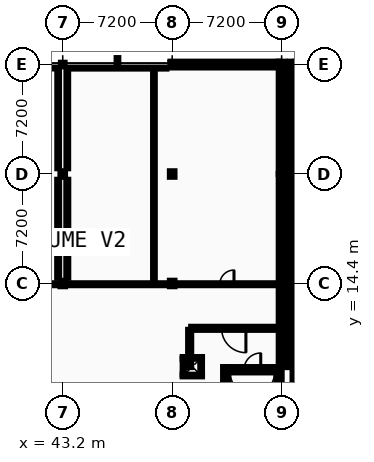
"""IFC4 building model, lengths in metres.
Left out: names, types, materials, properties, quantities, classifications, styles, units other than length and angle.
Written with IfcOpenShell. Run it as: python <this file> out.ifc"""

import sys

from ifc_helpers import new_model, si_unit, direction, frame, frame_2d, origin, origin_2d, place, context, subcontext, project, spatial, rectangle, i_section, extrude, element, fill, save


model = new_model("IFC4")
c1 = context("Model", 3, precision=1e-05, world=origin(), true_north=direction((0.0, 1.0)))
c2 = subcontext(c1, "Body", "Model", "MODEL_VIEW")
j1 = project(units=[si_unit("LENGTHUNIT", "METRE"), si_unit("PLANEANGLEUNIT", "RADIAN")], contexts=[c1])
p1 = place(None, origin())
s1 = spatial("IfcSite", under=j1, at=p1, CompositionType="ELEMENT")
p2 = place(p1, origin())
s2 = spatial("IfcBuilding", under=s1, at=p2, CompositionType="ELEMENT")
p3 = place(p2, frame((0.0, 0.0, 9.6)))
s3 = spatial("IfcBuildingStorey", under=s2, at=p3, CompositionType="ELEMENT", Elevation=9.6)
for number, where, z_axis, x_axis in (
    (1, (43.2, 14.4, 0.0), (0.0, 0.0, 1.0), (1.0, 0.0, 0.0)),
    (2, (43.2, 21.6, 0.0), (0.0, 0.0, 1.0), (1.0, 0.0, 0.0)),
):
    element("IfcColumn", number, at=place(p3, frame(where, z_axis=z_axis, x_axis=x_axis)), inside=s3, PredefinedType="COLUMN", context=c2, shape_type="SweptSolid", body=[
        extrude(i_section(OverallWidth=0.3, OverallDepth=0.36, WebThickness=0.012, FlangeThickness=0.022, FilletRadius=0.027, at=origin_2d()), origin(), (0.0, 0.0, 1.0), 4.4),
    ])
p4 = place(p3, frame((43.2, 28.8, 0.0), z_axis=(0.0, 0.0, 1.0), x_axis=(1.0, 0.0, 0.0)))
e3 = element("IfcColumn", 3, at=p4, inside=s3, PredefinedType="COLUMN", context=c2, shape_type="SweptSolid", body=[
    extrude(i_section(OverallWidth=0.24, OverallDepth=0.24, WebThickness=0.01, FlangeThickness=0.017, FilletRadius=0.021, at=origin_2d()), origin(), (0.0, 0.0, 1.0), 4.4),
])
for number, where, z_axis, x_axis in (
    (4, (50.4, 14.4, 0.0), (0.0, 0.0, 1.0), (1.0, 0.0, 0.0)),
    (5, (50.4, 21.6, 0.0), (0.0, 0.0, 1.0), (1.0, 0.0, 0.0)),
):
    element("IfcColumn", number, at=place(p3, frame(where, z_axis=z_axis, x_axis=x_axis)), inside=s3, PredefinedType="COLUMN", context=c2, shape_type="SweptSolid", body=[
        extrude(i_section(OverallWidth=0.3, OverallDepth=0.36, WebThickness=0.012, FlangeThickness=0.022, FilletRadius=0.027, at=origin_2d()), origin(), (0.0, 0.0, 1.0), 4.4),
    ])
p5 = place(p3, frame((50.4, 28.8, 0.0), z_axis=(0.0, 0.0, 1.0), x_axis=(1.0, 0.0, 0.0)))
e6 = element("IfcColumn", 6, at=p5, inside=s3, PredefinedType="COLUMN", context=c2, shape_type="SweptSolid", body=[
    extrude(i_section(OverallWidth=0.24, OverallDepth=0.24, WebThickness=0.01, FlangeThickness=0.017, FilletRadius=0.021, at=origin_2d()), origin(), (0.0, 0.0, 1.0), 4.4),
])
for number, where, z_axis, x_axis in (
    (7, (57.6, 14.4, 0.0), (0.0, 0.0, 1.0), (1.0, 0.0, 0.0)),
    (8, (57.6, 21.6, 0.0), (0.0, 0.0, 1.0), (1.0, 0.0, 0.0)),
):
    element("IfcColumn", number, at=place(p3, frame(where, z_axis=z_axis, x_axis=x_axis)), inside=s3, PredefinedType="COLUMN", context=c2, shape_type="SweptSolid", body=[
        extrude(i_section(OverallWidth=0.3, OverallDepth=0.36, WebThickness=0.012, FlangeThickness=0.022, FilletRadius=0.027, at=origin_2d()), origin(), (0.0, 0.0, 1.0), 4.4),
    ])
p6 = place(p3, frame((57.6, 28.8, 0.0), z_axis=(0.0, 0.0, 1.0), x_axis=(1.0, 0.0, 0.0)))
e9 = element("IfcColumn", 9, at=p6, inside=s3, PredefinedType="COLUMN", context=c2, shape_type="SweptSolid", body=[
    extrude(i_section(OverallWidth=0.24, OverallDepth=0.24, WebThickness=0.01, FlangeThickness=0.017, FilletRadius=0.021, at=origin_2d()), origin(), (0.0, 0.0, 1.0), 4.4),
])
for number, where, z_axis, x_axis in (
    (10, (58.32, 14.4, 0.0), (0.0, 0.0, 1.0), (1.0, 0.0, 0.0)),
    (11, (58.32, 21.6, 0.0), (0.0, 0.0, 1.0), (1.0, 0.0, 0.0)),
):
    element("IfcColumn", number, at=place(p3, frame(where, z_axis=z_axis, x_axis=x_axis)), inside=s3, PredefinedType="COLUMN", context=c2, shape_type="SweptSolid", body=[
        extrude(i_section(OverallWidth=0.3, OverallDepth=0.36, WebThickness=0.012, FlangeThickness=0.022, FilletRadius=0.027, at=origin_2d()), origin(), (0.0, 0.0, 1.0), 4.4),
    ])
p7 = place(p3, frame((58.32, 28.8, 0.0), z_axis=(0.0, 0.0, 1.0), x_axis=(1.0, 0.0, 0.0)))
e12 = element("IfcColumn", 12, at=p7, inside=s3, PredefinedType="COLUMN", context=c2, shape_type="SweptSolid", body=[
    extrude(i_section(OverallWidth=0.24, OverallDepth=0.24, WebThickness=0.01, FlangeThickness=0.017, FilletRadius=0.021, at=origin_2d()), origin(), (0.0, 0.0, 1.0), 4.4),
])
p8 = place(p3, frame((57.41, 28.8, 0.0), z_axis=(0.0, 0.0, 1.0), x_axis=(-1.0, 0.0, 0.0)))
e13 = element("IfcWall", 13, at=p8, inside=s3, PredefinedType="STANDARD", context=c2, shape_type="SweptSolid", body=[
    extrude(rectangle(XDim=7.12, YDim=0.38, at=frame_2d((3.56, 0.0))), origin(), (0.0, 0.0, 1.0), 3.9),
])
p9 = place(p8, frame((1.689, 0.0, 0.95)))
e14 = element("IfcOpeningElement", 14, at=p9, cuts=e13, PredefinedType="OPENING", context=c2, shape_type="SweptSolid", body=[
    extrude(rectangle(XDim=0.894, YDim=1.368, at=frame_2d((0.447, 0.684))), frame((0.0, 0.2, 0.0), z_axis=(0.0, -1.0, 0.0), x_axis=(1.0, 0.0, 0.0)), (0.0, 0.0, 1.0), 0.4),
])
p10 = place(p8, frame((4.537, 0.0, 0.95)))
e15 = element("IfcOpeningElement", 15, at=p10, cuts=e13, PredefinedType="OPENING", context=c2, shape_type="SweptSolid", body=[
    extrude(rectangle(XDim=0.894, YDim=1.368, at=frame_2d((0.447, 0.684))), frame((0.0, 0.2, 0.0), z_axis=(0.0, -1.0, 0.0), x_axis=(1.0, 0.0, 0.0)), (0.0, 0.0, 1.0), 0.4),
])
p11 = place(p3, frame((57.6, 8.9, 0.0), z_axis=(0.0, 0.0, 1.0), x_axis=(0.0, 1.0, 0.0)))
e16 = element("IfcWall", 16, at=p11, inside=s3, PredefinedType="STANDARD", context=c2, shape_type="SweptSolid", body=[
    extrude(rectangle(XDim=5.5, YDim=0.38, at=frame_2d((2.75, 0.0))), origin(), (0.0, 0.0, 1.0), 4.2),
])
p12 = place(p3, frame((57.6, 14.4, 0.0), z_axis=(0.0, 0.0, 1.0), x_axis=(0.0, 1.0, 0.0)))
e17 = element("IfcWall", 17, at=p12, inside=s3, PredefinedType="STANDARD", context=c2, shape_type="SweptSolid", body=[
    extrude(rectangle(XDim=7.2, YDim=0.38, at=frame_2d((3.6, 0.0))), origin(), (0.0, 0.0, 1.0), 3.895),
])
p13 = place(p12, frame((1.594, 0.0, 0.95)))
e18 = element("IfcOpeningElement", 18, at=p13, cuts=e17, PredefinedType="OPENING", context=c2, shape_type="SweptSolid", body=[
    extrude(rectangle(XDim=1.132, YDim=1.368, at=frame_2d((0.566, 0.684))), frame((0.0, 0.2, 0.0), z_axis=(0.0, -1.0, 0.0), x_axis=(1.0, 0.0, 0.0)), (0.0, 0.0, 1.0), 0.4),
])
p14 = place(p12, frame((4.474, 0.0, 0.95)))
e19 = element("IfcOpeningElement", 19, at=p14, cuts=e17, PredefinedType="OPENING", context=c2, shape_type="SweptSolid", body=[
    extrude(rectangle(XDim=1.132, YDim=1.368, at=frame_2d((0.566, 0.684))), frame((0.0, 0.2, 0.0), z_axis=(0.0, -1.0, 0.0), x_axis=(1.0, 0.0, 0.0)), (0.0, 0.0, 1.0), 0.4),
])
p15 = place(p3, frame((57.6, 21.6, 0.0), z_axis=(0.0, 0.0, 1.0), x_axis=(0.0, 1.0, 0.0)))
e20 = element("IfcWall", 20, at=p15, inside=s3, PredefinedType="STANDARD", context=c2, shape_type="SweptSolid", body=[
    extrude(rectangle(XDim=7.39, YDim=0.38, at=frame_2d((3.695, 0.0))), origin(), (0.0, 0.0, 1.0), 3.9),
])
p16 = place(p15, frame((1.634, 0.0, 0.95)))
e21 = element("IfcOpeningElement", 21, at=p16, cuts=e20, PredefinedType="OPENING", context=c2, shape_type="SweptSolid", body=[
    extrude(rectangle(XDim=1.166, YDim=1.368, at=frame_2d((0.583, 0.684))), frame((0.0, 0.2, 0.0), z_axis=(0.0, -1.0, 0.0), x_axis=(1.0, 0.0, 0.0)), (0.0, 0.0, 1.0), 0.4),
])
p17 = place(p15, frame((4.59, 0.0, 0.95)))
e22 = element("IfcOpeningElement", 22, at=p17, cuts=e20, PredefinedType="OPENING", context=c2, shape_type="SweptSolid", body=[
    extrude(rectangle(XDim=1.166, YDim=1.368, at=frame_2d((0.583, 0.684))), frame((0.0, 0.2, 0.0), z_axis=(0.0, -1.0, 0.0), x_axis=(1.0, 0.0, 0.0)), (0.0, 0.0, 1.0), 0.4),
])
p18 = place(p3, frame((58.32, 14.4, 0.0), z_axis=(0.0, 0.0, 1.0), x_axis=(0.0, -1.0, 0.0)))
e23 = element("IfcWall", 23, at=p18, inside=s3, PredefinedType="STANDARD", context=c2, shape_type="SweptSolid", body=[
    extrude(rectangle(XDim=5.5, YDim=0.38, at=frame_2d((2.75, 0.0))), origin(), (0.0, 0.0, 1.0), 4.2),
])
p19 = place(p3, frame((58.32, 21.6, 0.0), z_axis=(0.0, 0.0, 1.0), x_axis=(0.0, -1.0, 0.0)))
e24 = element("IfcWall", 24, at=p19, inside=s3, PredefinedType="STANDARD", context=c2, shape_type="SweptSolid", body=[
    extrude(rectangle(XDim=7.2, YDim=0.38, at=frame_2d((3.6, 0.0))), origin(), (0.0, 0.0, 1.0), 3.895),
])
p20 = place(p19, frame((1.713, 0.0, 0.95)))
e25 = element("IfcOpeningElement", 25, at=p20, cuts=e24, PredefinedType="OPENING", context=c2, shape_type="SweptSolid", body=[
    extrude(rectangle(XDim=0.894, YDim=1.332, at=frame_2d((0.447, 0.666))), frame((0.0, 0.2, 0.0), z_axis=(0.0, -1.0, 0.0), x_axis=(1.0, 0.0, 0.0)), (0.0, 0.0, 1.0), 0.4),
])
p21 = place(p19, frame((4.593, 0.0, 0.95)))
e26 = element("IfcOpeningElement", 26, at=p21, cuts=e24, PredefinedType="OPENING", context=c2, shape_type="SweptSolid", body=[
    extrude(rectangle(XDim=0.894, YDim=1.332, at=frame_2d((0.447, 0.666))), frame((0.0, 0.2, 0.0), z_axis=(0.0, -1.0, 0.0), x_axis=(1.0, 0.0, 0.0)), (0.0, 0.0, 1.0), 0.4),
])
p22 = place(p3, frame((58.32, 28.99, 0.0), z_axis=(0.0, 0.0, 1.0), x_axis=(0.0, -1.0, 0.0)))
e27 = element("IfcWall", 27, at=p22, inside=s3, PredefinedType="STANDARD", context=c2, shape_type="SweptSolid", body=[
    extrude(rectangle(XDim=7.39, YDim=0.38, at=frame_2d((3.695, 0.0))), origin(), (0.0, 0.0, 1.0), 3.9),
])
p23 = place(p22, frame((1.753, 0.0, 0.95)))
e28 = element("IfcOpeningElement", 28, at=p23, cuts=e27, PredefinedType="OPENING", context=c2, shape_type="SweptSolid", body=[
    extrude(rectangle(XDim=0.928, YDim=1.332, at=frame_2d((0.464, 0.666))), frame((0.0, 0.2, 0.0), z_axis=(0.0, -1.0, 0.0), x_axis=(1.0, 0.0, 0.0)), (0.0, 0.0, 1.0), 0.4),
])
p24 = place(p22, frame((4.709, 0.0, 0.95)))
e29 = element("IfcOpeningElement", 29, at=p24, cuts=e27, PredefinedType="OPENING", context=c2, shape_type="SweptSolid", body=[
    extrude(rectangle(XDim=0.928, YDim=1.332, at=frame_2d((0.464, 0.666))), frame((0.0, 0.2, 0.0), z_axis=(0.0, -1.0, 0.0), x_axis=(1.0, 0.0, 0.0)), (0.0, 0.0, 1.0), 0.4),
])
p25 = place(p3, frame((54.1, 8.725, 0.0), z_axis=(0.0, 0.0, 1.0), x_axis=(1.0, 0.0, 0.0)))
e30 = element("IfcWall", 30, at=p25, inside=s3, PredefinedType="SHEAR", context=c2, shape_type="SweptSolid", body=[
    extrude(rectangle(XDim=3.15, YDim=0.35, at=frame_2d((1.575, 0.0))), origin(), (0.0, 0.0, 1.0), 4.2),
])
p26 = place(p25, frame((1.025, 0.0, 0.0)))
e31 = element("IfcOpeningElement", 31, at=p26, cuts=e30, PredefinedType="OPENING", context=c2, shape_type="SweptSolid", body=[
    extrude(rectangle(XDim=1.1, YDim=2.15, at=frame_2d((0.55, 1.075))), frame((0.0, 0.185, 0.0), z_axis=(0.0, -1.0, 0.0), x_axis=(1.0, 0.0, 0.0)), (0.0, 0.0, 1.0), 0.37),
])
for number, where, z_axis, x_axis in (
    (32, (53.925, 0.4, 0.0), (0.0, 0.0, 1.0), (0.0, 1.0, 0.0)),
    (33, (57.425, 0.4, 0.0), (0.0, 0.0, 1.0), (0.0, 1.0, 0.0)),
):
    element("IfcWall", number, at=place(p3, frame(where, z_axis=z_axis, x_axis=x_axis)), inside=s3, PredefinedType="SHEAR", context=c2, shape_type="SweptSolid", body=[
        extrude(rectangle(XDim=8.5, YDim=0.35, at=frame_2d((4.25, 0.0))), origin(), (0.0, 0.0, 1.0), 4.2),
    ])
p27 = place(p3, frame((51.65, 11.45, 0.0), z_axis=(0.0, 0.0, 1.0), x_axis=(1.0, 0.0, 0.0)))
e34 = element("IfcWall", 34, at=p27, inside=s3, PredefinedType="PARTITIONING", context=c2, shape_type="SweptSolid", body=[
    extrude(rectangle(XDim=5.6, YDim=0.2, at=frame_2d((2.8, 0.0))), origin(), (0.0, 0.0, 1.0), 4.2),
])
p28 = place(p27, frame((2.0, 0.0, 0.0)))
e35 = element("IfcOpeningElement", 35, at=p28, cuts=e34, PredefinedType="OPENING", context=c2, shape_type="SweptSolid", body=[
    extrude(rectangle(XDim=1.6, YDim=2.2, at=frame_2d((0.8, 1.1))), frame((0.0, 0.11, 0.0), z_axis=(0.0, -1.0, 0.0), x_axis=(1.0, 0.0, 0.0)), (0.0, 0.0, 1.0), 0.22),
])
p29 = place(p3, frame((51.55, 8.9, 0.0), z_axis=(0.0, 0.0, 1.0), x_axis=(0.0, 1.0, 0.0)))
e36 = element("IfcWall", 36, at=p29, inside=s3, PredefinedType="PARTITIONING", context=c2, shape_type="SweptSolid", body=[
    extrude(rectangle(XDim=2.45, YDim=0.2, at=frame_2d((1.225, 0.0))), origin(), (0.0, 0.0, 1.0), 4.2),
])
p30 = place(p3, frame((58.495, 0.4, 0.0), z_axis=(0.0, 0.0, 1.0), x_axis=(0.0, 1.0, 0.0)))
e37 = element("IfcWall", 37, at=p30, inside=s3, PredefinedType="SHEAR", context=c2, shape_type="SweptSolid", body=[
    extrude(rectangle(XDim=8.5, YDim=0.35, at=frame_2d((4.25, 0.0))), origin(), (0.0, 0.0, 1.0), 4.2),
])
for number, where, z_axis, x_axis in (
    (38, (51.09, 8.345, 0.0), (0.0, 0.0, 1.0), (1.0, 0.0, 0.0)),
    (39, (51.09, 9.505, 0.0), (0.0, 0.0, 1.0), (1.0, 0.0, 0.0)),
):
    element("IfcWall", number, at=place(p3, frame(where, z_axis=z_axis, x_axis=x_axis)), inside=s3, PredefinedType="PARTITIONING", context=c2, shape_type="SweptSolid", body=[
        extrude(rectangle(XDim=1.27, YDim=0.11, at=frame_2d((0.635, 0.0))), origin(), (0.0, 0.0, 1.0), 4.2),
    ])
for number, where, z_axis, x_axis in (
    (40, (51.145, 8.4, 0.0), (0.0, 0.0, 1.0), (0.0, 1.0, 0.0)),
    (41, (52.305, 8.4, 0.0), (0.0, 0.0, 1.0), (0.0, 1.0, 0.0)),
):
    element("IfcWall", number, at=place(p3, frame(where, z_axis=z_axis, x_axis=x_axis)), inside=s3, PredefinedType="PARTITIONING", context=c2, shape_type="SweptSolid", body=[
        extrude(rectangle(XDim=1.05, YDim=0.11, at=frame_2d((0.525, 0.0))), origin(), (0.0, 0.0, 1.0), 4.2),
    ])
p31 = place(p3, frame((36.38, 14.35, 0.0), z_axis=(0.0, 0.0, 1.0), x_axis=(1.0, 0.0, 0.0)))
e42 = element("IfcWall", 42, at=p31, inside=s3, PredefinedType="PARTITIONING", context=c2, shape_type="SweptSolid", body=[
    extrude(rectangle(XDim=6.44, YDim=0.125, at=frame_2d((3.22, 0.0))), origin(), (0.0, 0.0, 1.0), 3.895),
])
p32 = place(p31, frame((3.14, 0.0, 0.0)))
e43 = element("IfcOpeningElement", 43, at=p32, cuts=e42, PredefinedType="OPENING", context=c2, shape_type="SweptSolid", body=[
    extrude(rectangle(XDim=0.9, YDim=2.1, at=frame_2d((0.45, 1.05))), frame((0.0, 0.073, 0.0), z_axis=(0.0, -1.0, 0.0), x_axis=(1.0, 0.0, 0.0)), (0.0, 0.0, 1.0), 0.145),
])
p33 = place(p3, frame((43.58, 14.35, 0.0), z_axis=(0.0, 0.0, 1.0), x_axis=(1.0, 0.0, 0.0)))
e44 = element("IfcWall", 44, at=p33, inside=s3, PredefinedType="PARTITIONING", context=c2, shape_type="SweptSolid", body=[
    extrude(rectangle(XDim=6.44, YDim=0.125, at=frame_2d((3.22, 0.0))), origin(), (0.0, 0.0, 1.0), 3.895),
])
p34 = place(p33, frame((2.31, 0.0, 0.0)))
e45 = element("IfcOpeningElement", 45, at=p34, cuts=e44, PredefinedType="OPENING", context=c2, shape_type="SweptSolid", body=[
    extrude(rectangle(XDim=1.0, YDim=2.1, at=frame_2d((0.5, 1.05))), frame((0.0, 0.073, 0.0), z_axis=(0.0, -1.0, 0.0), x_axis=(1.0, 0.0, 0.0)), (0.0, 0.0, 1.0), 0.145),
])
p35 = place(p3, frame((50.78, 14.35, 0.0), z_axis=(0.0, 0.0, 1.0), x_axis=(1.0, 0.0, 0.0)))
e46 = element("IfcWall", 46, at=p35, inside=s3, PredefinedType="PARTITIONING", context=c2, shape_type="SweptSolid", body=[
    extrude(rectangle(XDim=6.44, YDim=0.125, at=frame_2d((3.22, 0.0))), origin(), (0.0, 0.0, 1.0), 3.895),
])
p36 = place(p35, frame((2.754, 0.0, 0.0)))
e47 = element("IfcOpeningElement", 47, at=p36, cuts=e46, PredefinedType="OPENING", context=c2, shape_type="SweptSolid", body=[
    extrude(rectangle(XDim=0.932, YDim=2.152, at=frame_2d((0.466, 1.076))), frame((0.0, 0.073, 0.0), z_axis=(0.0, -1.0, 0.0), x_axis=(1.0, 0.0, 0.0)), (0.0, 0.0, 1.0), 0.145),
])
p37 = place(p3, frame((36.38, 28.6, 0.0), z_axis=(0.0, 0.0, 1.0), x_axis=(1.0, 0.0, 0.0)))
e48 = element("IfcWall", 48, at=p37, inside=s3, PredefinedType="PARTITIONING", context=c2, shape_type="SweptSolid", body=[
    extrude(rectangle(XDim=6.44, YDim=0.11, at=frame_2d((3.22, 0.0))), origin(), (0.0, 0.0, 1.0), 3.9),
])
p38 = place(p3, frame((43.58, 28.6, 0.0), z_axis=(0.0, 0.0, 1.0), x_axis=(1.0, 0.0, 0.0)))
e49 = element("IfcWall", 49, at=p38, inside=s3, PredefinedType="PARTITIONING", context=c2, shape_type="SweptSolid", body=[
    extrude(rectangle(XDim=6.44, YDim=0.125, at=frame_2d((3.22, 0.0))), origin(), (0.0, 0.0, 1.0), 3.9),
])
p39 = place(p3, frame((42.9, 14.78, 0.0), z_axis=(0.0, 0.0, 1.0), x_axis=(0.0, 1.0, 0.0)))
e50 = element("IfcWall", 50, at=p39, inside=s3, PredefinedType="PARTITIONING", context=c2, shape_type="SweptSolid", body=[
    extrude(rectangle(XDim=6.44, YDim=0.125, at=frame_2d((3.22, 0.0))), origin(), (0.0, 0.0, 1.0), 4.2),
])
p40 = place(p3, frame((42.9, 21.98, 0.0), z_axis=(0.0, 0.0, 1.0), x_axis=(0.0, 1.0, 0.0)))
e51 = element("IfcWall", 51, at=p40, inside=s3, PredefinedType="PARTITIONING", context=c2, shape_type="SweptSolid", body=[
    extrude(rectangle(XDim=6.44, YDim=0.11, at=frame_2d((3.22, 0.0))), origin(), (0.0, 0.0, 1.0), 4.2),
])
p41 = place(p3, frame((43.5, 14.78, 0.0), z_axis=(0.0, 0.0, 1.0), x_axis=(0.0, 1.0, 0.0)))
e52 = element("IfcWall", 52, at=p41, inside=s3, PredefinedType="PARTITIONING", context=c2, shape_type="SweptSolid", body=[
    extrude(rectangle(XDim=6.44, YDim=0.125, at=frame_2d((3.22, 0.0))), origin(), (0.0, 0.0, 1.0), 4.2),
])
p42 = place(p3, frame((43.5, 21.98, 0.0), z_axis=(0.0, 0.0, 1.0), x_axis=(0.0, 1.0, 0.0)))
e53 = element("IfcWall", 53, at=p42, inside=s3, PredefinedType="PARTITIONING", context=c2, shape_type="SweptSolid", body=[
    extrude(rectangle(XDim=6.44, YDim=0.11, at=frame_2d((3.22, 0.0))), origin(), (0.0, 0.0, 1.0), 4.2),
])
p43 = place(p3, frame((49.2, 14.413, 0.0), z_axis=(0.0, 0.0, 1.0), x_axis=(0.0, 1.0, 0.0)))
e54 = element("IfcWall", 54, at=p43, inside=s3, PredefinedType="PARTITIONING", context=c2, shape_type="SweptSolid", body=[
    extrude(rectangle(XDim=14.125, YDim=0.11, at=frame_2d((7.062, 0.0))), origin(), (0.0, 0.0, 1.0), 4.2),
])
p44 = place(p9, origin())
e55 = element("IfcWindow", 55, at=p44, inside=s3, PartitioningType="SINGLE_PANEL", PredefinedType="WINDOW", context=c2, shape_type="SweptSolid", body=[
    extrude(rectangle(XDim=0.894, YDim=1.368, at=frame_2d((0.447, 0.684))), frame((0.0, 0.03, 0.0), z_axis=(0.0, -1.0, 0.0), x_axis=(1.0, 0.0, 0.0)), (0.0, 0.0, 1.0), 0.06),
])
fill(e14, e55)
p45 = place(p10, origin())
e56 = element("IfcWindow", 56, at=p45, inside=s3, PartitioningType="SINGLE_PANEL", PredefinedType="WINDOW", context=c2, shape_type="SweptSolid", body=[
    extrude(rectangle(XDim=0.894, YDim=1.368, at=frame_2d((0.447, 0.684))), frame((0.0, 0.03, 0.0), z_axis=(0.0, -1.0, 0.0), x_axis=(1.0, 0.0, 0.0)), (0.0, 0.0, 1.0), 0.06),
])
fill(e15, e56)
p46 = place(p13, origin())
e57 = element("IfcWindow", 57, at=p46, inside=s3, PartitioningType="SINGLE_PANEL", PredefinedType="WINDOW", context=c2, shape_type="SweptSolid", body=[
    extrude(rectangle(XDim=1.132, YDim=1.368, at=frame_2d((0.566, 0.684))), frame((0.0, 0.03, 0.0), z_axis=(0.0, -1.0, 0.0), x_axis=(1.0, 0.0, 0.0)), (0.0, 0.0, 1.0), 0.06),
])
fill(e18, e57)
p47 = place(p14, origin())
e58 = element("IfcWindow", 58, at=p47, inside=s3, PartitioningType="SINGLE_PANEL", PredefinedType="WINDOW", context=c2, shape_type="SweptSolid", body=[
    extrude(rectangle(XDim=1.132, YDim=1.368, at=frame_2d((0.566, 0.684))), frame((0.0, 0.03, 0.0), z_axis=(0.0, -1.0, 0.0), x_axis=(1.0, 0.0, 0.0)), (0.0, 0.0, 1.0), 0.06),
])
fill(e19, e58)
p48 = place(p16, origin())
e59 = element("IfcWindow", 59, at=p48, inside=s3, PartitioningType="SINGLE_PANEL", PredefinedType="WINDOW", context=c2, shape_type="SweptSolid", body=[
    extrude(rectangle(XDim=1.166, YDim=1.368, at=frame_2d((0.583, 0.684))), frame((0.0, 0.03, 0.0), z_axis=(0.0, -1.0, 0.0), x_axis=(1.0, 0.0, 0.0)), (0.0, 0.0, 1.0), 0.06),
])
fill(e21, e59)
p49 = place(p17, origin())
e60 = element("IfcWindow", 60, at=p49, inside=s3, PartitioningType="SINGLE_PANEL", PredefinedType="WINDOW", context=c2, shape_type="SweptSolid", body=[
    extrude(rectangle(XDim=1.166, YDim=1.368, at=frame_2d((0.583, 0.684))), frame((0.0, 0.03, 0.0), z_axis=(0.0, -1.0, 0.0), x_axis=(1.0, 0.0, 0.0)), (0.0, 0.0, 1.0), 0.06),
])
fill(e22, e60)
p50 = place(p20, origin())
e61 = element("IfcWindow", 61, at=p50, inside=s3, PartitioningType="SINGLE_PANEL", PredefinedType="WINDOW", context=c2, shape_type="SweptSolid", body=[
    extrude(rectangle(XDim=0.894, YDim=1.332, at=frame_2d((0.447, 0.666))), frame((0.0, 0.03, 0.0), z_axis=(0.0, -1.0, 0.0), x_axis=(1.0, 0.0, 0.0)), (0.0, 0.0, 1.0), 0.06),
])
fill(e25, e61)
p51 = place(p21, origin())
e62 = element("IfcWindow", 62, at=p51, inside=s3, PartitioningType="SINGLE_PANEL", PredefinedType="WINDOW", context=c2, shape_type="SweptSolid", body=[
    extrude(rectangle(XDim=0.894, YDim=1.332, at=frame_2d((0.447, 0.666))), frame((0.0, 0.03, 0.0), z_axis=(0.0, -1.0, 0.0), x_axis=(1.0, 0.0, 0.0)), (0.0, 0.0, 1.0), 0.06),
])
fill(e26, e62)
p52 = place(p23, origin())
e63 = element("IfcWindow", 63, at=p52, inside=s3, PartitioningType="SINGLE_PANEL", PredefinedType="WINDOW", context=c2, shape_type="SweptSolid", body=[
    extrude(rectangle(XDim=0.928, YDim=1.332, at=frame_2d((0.464, 0.666))), frame((0.0, 0.03, 0.0), z_axis=(0.0, -1.0, 0.0), x_axis=(1.0, 0.0, 0.0)), (0.0, 0.0, 1.0), 0.06),
])
fill(e28, e63)
p53 = place(p24, origin())
e64 = element("IfcWindow", 64, at=p53, inside=s3, PartitioningType="SINGLE_PANEL", PredefinedType="WINDOW", context=c2, shape_type="SweptSolid", body=[
    extrude(rectangle(XDim=0.928, YDim=1.332, at=frame_2d((0.464, 0.666))), frame((0.0, 0.03, 0.0), z_axis=(0.0, -1.0, 0.0), x_axis=(1.0, 0.0, 0.0)), (0.0, 0.0, 1.0), 0.06),
])
fill(e29, e64)
p54 = place(p26, frame((1.1, 0.0, 0.0), z_axis=(0.0, 0.0, 1.0), x_axis=(-1.0, 0.0, 0.0)))
e65 = element("IfcDoor", 65, at=p54, inside=s3, OperationType="SINGLE_SWING_RIGHT", PredefinedType="DOOR", context=c2, shape_type="SweptSolid", body=[
    extrude(rectangle(XDim=1.1, YDim=2.15, at=frame_2d((0.55, 1.075))), frame((0.0, 0.025, 0.0), z_axis=(0.0, -1.0, 0.0), x_axis=(1.0, 0.0, 0.0)), (0.0, 0.0, 1.0), 0.05),
])
fill(e31, e65)
p55 = place(p28, origin())
e66 = element("IfcDoor", 66, at=p55, inside=s3, OperationType="DOUBLE_DOOR_SINGLE_SWING", PredefinedType="DOOR", context=c2, shape_type="SweptSolid", body=[
    extrude(rectangle(XDim=1.6, YDim=2.2, at=frame_2d((0.8, 1.1))), frame((0.0, 0.025, 0.0), z_axis=(0.0, -1.0, 0.0), x_axis=(1.0, 0.0, 0.0)), (0.0, 0.0, 1.0), 0.05),
])
fill(e35, e66)
p56 = place(p34, frame((1.0, 0.0, 0.0), z_axis=(0.0, 0.0, 1.0), x_axis=(-1.0, 0.0, 0.0)))
e67 = element("IfcDoor", 67, at=p56, inside=s3, OperationType="SLIDING_TO_LEFT", PredefinedType="DOOR", context=c2, shape_type="SweptSolid", body=[
    extrude(rectangle(XDim=1.0, YDim=2.1, at=frame_2d((0.5, 1.05))), frame((0.0, 0.025, 0.0), z_axis=(0.0, -1.0, 0.0), x_axis=(1.0, 0.0, 0.0)), (0.0, 0.0, 1.0), 0.05),
])
fill(e45, e67)
p57 = place(p36, frame((0.932, 0.0, 0.0), z_axis=(0.0, 0.0, 1.0), x_axis=(-1.0, 0.0, 0.0)))
e68 = element("IfcDoor", 68, at=p57, inside=s3, OperationType="SINGLE_SWING_RIGHT", PredefinedType="DOOR", context=c2, shape_type="SweptSolid", body=[
    extrude(rectangle(XDim=0.932, YDim=2.152, at=frame_2d((0.466, 1.076))), frame((0.0, 0.025, 0.0), z_axis=(0.0, -1.0, 0.0), x_axis=(1.0, 0.0, 0.0)), (0.0, 0.0, 1.0), 0.05),
])
fill(e47, e68)
save(model, sys.argv[1])
